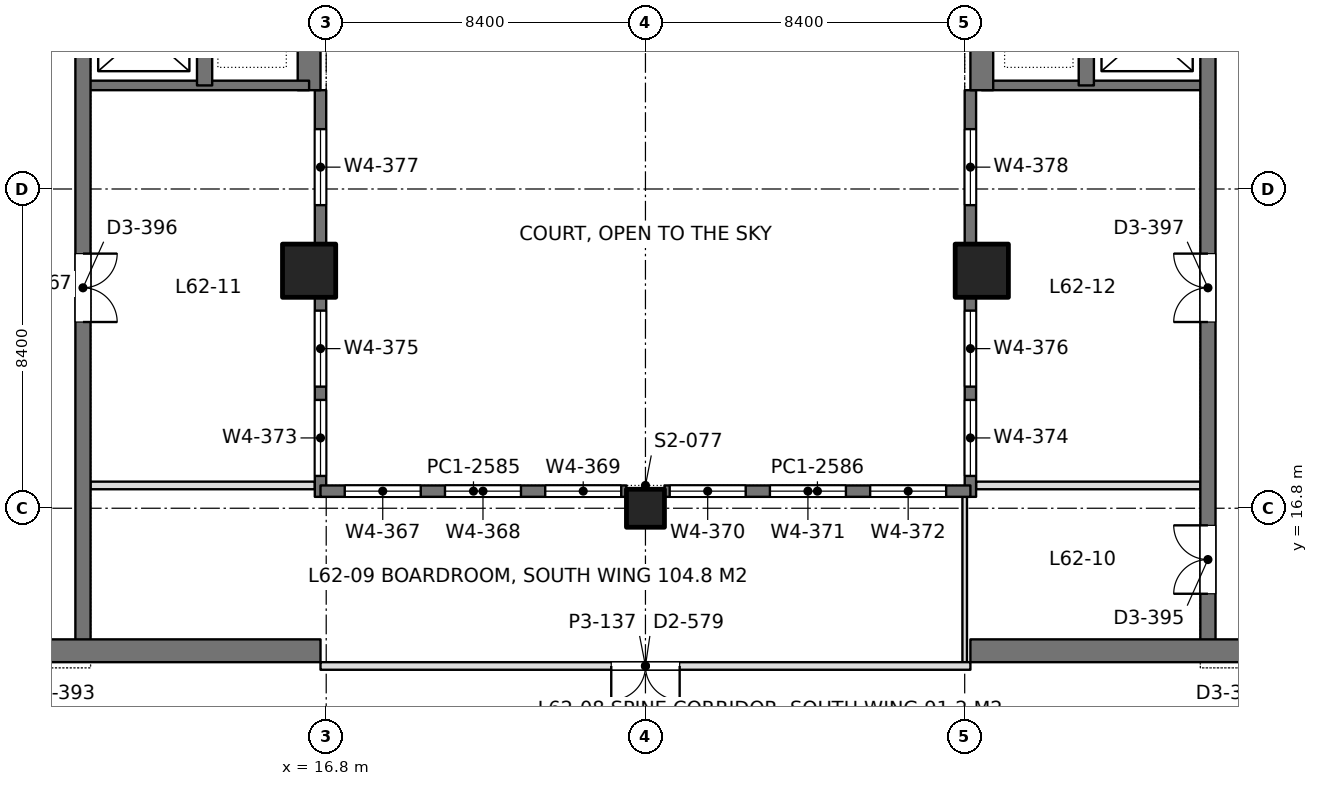
"""IFC4 building model, lengths in metres.
Left out: names, types, materials, properties, quantities, classifications, styles, units other than length and angle.
Written with IfcOpenShell. Run it as: python <this file> out.ifc"""

import sys

from ifc_helpers import new_model, si_unit, direction, frame, frame_2d, origin, origin_2d, place, context, subcontext, project, spatial, rectangle, extrude, element, fill, save


model = new_model("IFC4")
c1 = context("Model", 3, precision=1e-05, world=origin(), true_north=direction((0.0, 1.0)))
c2 = subcontext(c1, "Body", "Model", "MODEL_VIEW")
j1 = project(units=[si_unit("LENGTHUNIT", "METRE"), si_unit("PLANEANGLEUNIT", "RADIAN")], contexts=[c1])
p1 = place(None, origin())
s1 = spatial("IfcSite", under=j1, at=p1, CompositionType="ELEMENT")
p2 = place(p1, origin())
s2 = spatial("IfcBuilding", under=s1, at=p2, CompositionType="ELEMENT")
p3 = place(p2, frame((0.0, 0.0, 272.7)))
s3 = spatial("IfcBuildingStorey", under=s2, at=p3, CompositionType="ELEMENT", Elevation=272.7)
p4 = place(p3, frame((25.2, 16.8, 0.0), z_axis=(0.0, 0.0, 1.0), x_axis=(1.0, 0.0, 0.0)))
e1 = element("IfcColumn", 1, at=p4, inside=s3, PredefinedType="COLUMN", context=c2, shape_type="SweptSolid", body=[
    extrude(rectangle(XDim=1.0, YDim=1.0, at=origin_2d()), origin(), (0.0, 0.0, 1.0), 4.5),
])
for number, where, z_axis, x_axis in (
    (2, (16.35, 23.05, 0.0), (0.0, 0.0, 1.0), (1.0, 0.0, 0.0)),
    (3, (34.05, 23.05, 0.0), (0.0, 0.0, 1.0), (1.0, 0.0, 0.0)),
):
    element("IfcColumn", number, at=place(p3, frame(where, z_axis=z_axis, x_axis=x_axis)), inside=s3, PredefinedType="COLUMN", context=c2, shape_type="SweptSolid", body=[
        extrude(rectangle(XDim=1.4, YDim=1.4, at=origin_2d()), origin(), (0.0, 0.0, 1.0), 4.5),
    ])
p5 = place(p3, frame((-1.05, 13.05, 0.0), z_axis=(0.0, 0.0, 1.0), x_axis=(1.0, 0.0, 0.0)))
e4 = element("IfcWall", 4, at=p5, inside=s3, PredefinedType="SHEAR", context=c2, shape_type="SweptSolid", body=[
    extrude(rectangle(XDim=17.7, YDim=0.6, at=frame_2d((8.85, 0.0))), origin(), (0.0, 0.0, 1.0), 4.5),
])
p6 = place(p5, frame((8.8, 0.0, 0.0)))
e5 = element("IfcOpeningElement", 5, at=p6, cuts=e4, PredefinedType="OPENING", context=c2, shape_type="SweptSolid", body=[
    extrude(rectangle(XDim=1.8, YDim=2.4, at=frame_2d((0.9, 1.2))), frame((0.0, 0.31, 0.0), z_axis=(0.0, -1.0, 0.0), x_axis=(1.0, 0.0, 0.0)), (0.0, 0.0, 1.0), 0.62),
])
p7 = place(p3, frame((16.35, 27.8, 0.0), z_axis=(0.0, 0.0, 1.0), x_axis=(0.0, 1.0, 0.0)))
e6 = element("IfcWall", 6, at=p7, inside=s3, PredefinedType="SHEAR", context=c2, shape_type="SweptSolid", body=[
    extrude(rectangle(XDim=9.55, YDim=0.6, at=frame_2d((4.775, 0.0))), origin(), (0.0, 0.0, 1.0), 4.5),
])
p8 = place(p3, frame((10.4, 13.05, 0.0), z_axis=(0.0, 0.0, 1.0), x_axis=(0.0, 1.0, 0.0)))
e7 = element("IfcWall", 7, at=p8, inside=s3, PredefinedType="SHEAR", context=c2, shape_type="SweptSolid", body=[
    extrude(rectangle(XDim=24.3, YDim=0.4, at=frame_2d((12.15, 0.0))), origin(), (0.0, 0.0, 1.0), 4.5),
])
p9 = place(p8, frame((15.75, 0.0, 0.0)))
e8 = element("IfcOpeningElement", 8, at=p9, cuts=e7, PredefinedType="OPENING", context=c2, shape_type="SweptSolid", body=[
    extrude(rectangle(XDim=1.1, YDim=2.2, at=frame_2d((0.55, 1.1))), frame((0.0, 0.21, 0.0), z_axis=(0.0, -1.0, 0.0), x_axis=(1.0, 0.0, 0.0)), (0.0, 0.0, 1.0), 0.42),
])
p10 = place(p8, frame((18.6, 0.0, 0.0)))
e9 = element("IfcOpeningElement", 9, at=p10, cuts=e7, PredefinedType="OPENING", context=c2, shape_type="SweptSolid", body=[
    extrude(rectangle(XDim=1.1, YDim=2.2, at=frame_2d((0.55, 1.1))), frame((0.0, 0.21, 0.0), z_axis=(0.0, -1.0, 0.0), x_axis=(1.0, 0.0, 0.0)), (0.0, 0.0, 1.0), 0.42),
])
p11 = place(p8, frame((21.45, 0.0, 0.0)))
e10 = element("IfcOpeningElement", 10, at=p11, cuts=e7, PredefinedType="OPENING", context=c2, shape_type="SweptSolid", body=[
    extrude(rectangle(XDim=1.1, YDim=2.2, at=frame_2d((0.55, 1.1))), frame((0.0, 0.21, 0.0), z_axis=(0.0, -1.0, 0.0), x_axis=(1.0, 0.0, 0.0)), (0.0, 0.0, 1.0), 0.42),
])
p12 = place(p8, frame((8.65, 0.0, 0.0)))
e11 = element("IfcOpeningElement", 11, at=p12, cuts=e7, PredefinedType="OPENING", context=c2, shape_type="SweptSolid", body=[
    extrude(rectangle(XDim=1.8, YDim=2.4, at=frame_2d((0.9, 1.2))), frame((0.0, 0.21, 0.0), z_axis=(0.0, -1.0, 0.0), x_axis=(1.0, 0.0, 0.0)), (0.0, 0.0, 1.0), 0.42),
])
p13 = place(p3, frame((13.6, 27.925, 0.0), z_axis=(0.0, 0.0, 1.0), x_axis=(0.0, 1.0, 0.0)))
e12 = element("IfcWall", 12, at=p13, inside=s3, PredefinedType="SHEAR", context=c2, shape_type="SweptSolid", body=[
    extrude(rectangle(XDim=9.425, YDim=0.4, at=frame_2d((4.712, 0.0))), origin(), (0.0, 0.0, 1.0), 4.5),
])
p14 = place(p3, frame((10.4, 27.925, 0.0), z_axis=(0.0, 0.0, 1.0), x_axis=(1.0, 0.0, 0.0)))
e13 = element("IfcWall", 13, at=p14, inside=s3, PredefinedType="SHEAR", context=c2, shape_type="SweptSolid", body=[
    extrude(rectangle(XDim=5.95, YDim=0.25, at=frame_2d((2.975, 0.0))), origin(), (0.0, 0.0, 1.0), 4.5),
])
p15 = place(p3, frame((33.75, 13.05, 0.0), z_axis=(0.0, 0.0, 1.0), x_axis=(1.0, 0.0, 0.0)))
e14 = element("IfcWall", 14, at=p15, inside=s3, PredefinedType="SHEAR", context=c2, shape_type="SweptSolid", body=[
    extrude(rectangle(XDim=17.7, YDim=0.6, at=frame_2d((8.85, 0.0))), origin(), (0.0, 0.0, 1.0), 4.5),
])
p16 = place(p15, frame((7.1, 0.0, 0.0)))
e15 = element("IfcOpeningElement", 15, at=p16, cuts=e14, PredefinedType="OPENING", context=c2, shape_type="SweptSolid", body=[
    extrude(rectangle(XDim=1.8, YDim=2.4, at=frame_2d((0.9, 1.2))), frame((0.0, 0.31, 0.0), z_axis=(0.0, -1.0, 0.0), x_axis=(1.0, 0.0, 0.0)), (0.0, 0.0, 1.0), 0.62),
])
p17 = place(p3, frame((34.05, 27.8, 0.0), z_axis=(0.0, 0.0, 1.0), x_axis=(0.0, 1.0, 0.0)))
e16 = element("IfcWall", 16, at=p17, inside=s3, PredefinedType="SHEAR", context=c2, shape_type="SweptSolid", body=[
    extrude(rectangle(XDim=9.55, YDim=0.6, at=frame_2d((4.775, 0.0))), origin(), (0.0, 0.0, 1.0), 4.5),
])
p18 = place(p3, frame((40.0, 13.05, 0.0), z_axis=(0.0, 0.0, 1.0), x_axis=(0.0, 1.0, 0.0)))
e17 = element("IfcWall", 17, at=p18, inside=s3, PredefinedType="SHEAR", context=c2, shape_type="SweptSolid", body=[
    extrude(rectangle(XDim=24.3, YDim=0.4, at=frame_2d((12.15, 0.0))), origin(), (0.0, 0.0, 1.0), 4.5),
])
p19 = place(p18, frame((15.75, 0.0, 0.0)))
e18 = element("IfcOpeningElement", 18, at=p19, cuts=e17, PredefinedType="OPENING", context=c2, shape_type="SweptSolid", body=[
    extrude(rectangle(XDim=1.1, YDim=2.2, at=frame_2d((0.55, 1.1))), frame((0.0, 0.21, 0.0), z_axis=(0.0, -1.0, 0.0), x_axis=(1.0, 0.0, 0.0)), (0.0, 0.0, 1.0), 0.42),
])
p20 = place(p18, frame((18.6, 0.0, 0.0)))
e19 = element("IfcOpeningElement", 19, at=p20, cuts=e17, PredefinedType="OPENING", context=c2, shape_type="SweptSolid", body=[
    extrude(rectangle(XDim=1.1, YDim=2.2, at=frame_2d((0.55, 1.1))), frame((0.0, 0.21, 0.0), z_axis=(0.0, -1.0, 0.0), x_axis=(1.0, 0.0, 0.0)), (0.0, 0.0, 1.0), 0.42),
])
p21 = place(p18, frame((21.45, 0.0, 0.0)))
e20 = element("IfcOpeningElement", 20, at=p21, cuts=e17, PredefinedType="OPENING", context=c2, shape_type="SweptSolid", body=[
    extrude(rectangle(XDim=1.1, YDim=2.2, at=frame_2d((0.55, 1.1))), frame((0.0, 0.21, 0.0), z_axis=(0.0, -1.0, 0.0), x_axis=(1.0, 0.0, 0.0)), (0.0, 0.0, 1.0), 0.42),
])
p22 = place(p18, frame((8.65, 0.0, 0.0)))
e21 = element("IfcOpeningElement", 21, at=p22, cuts=e17, PredefinedType="OPENING", context=c2, shape_type="SweptSolid", body=[
    extrude(rectangle(XDim=1.8, YDim=2.4, at=frame_2d((0.9, 1.2))), frame((0.0, 0.21, 0.0), z_axis=(0.0, -1.0, 0.0), x_axis=(1.0, 0.0, 0.0)), (0.0, 0.0, 1.0), 0.42),
])
p23 = place(p18, frame((1.5, 0.0, 0.0)))
e22 = element("IfcOpeningElement", 22, at=p23, cuts=e17, PredefinedType="OPENING", context=c2, shape_type="SweptSolid", body=[
    extrude(rectangle(XDim=1.8, YDim=2.4, at=frame_2d((0.9, 1.2))), frame((0.0, 0.21, 0.0), z_axis=(0.0, -1.0, 0.0), x_axis=(1.0, 0.0, 0.0)), (0.0, 0.0, 1.0), 0.42),
])
p24 = place(p3, frame((36.8, 27.925, 0.0), z_axis=(0.0, 0.0, 1.0), x_axis=(0.0, 1.0, 0.0)))
e23 = element("IfcWall", 23, at=p24, inside=s3, PredefinedType="SHEAR", context=c2, shape_type="SweptSolid", body=[
    extrude(rectangle(XDim=9.425, YDim=0.4, at=frame_2d((4.712, 0.0))), origin(), (0.0, 0.0, 1.0), 4.5),
])
p25 = place(p3, frame((40.0, 27.925, 0.0), z_axis=(0.0, 0.0, 1.0), x_axis=(-1.0, 0.0, 0.0)))
e24 = element("IfcWall", 24, at=p25, inside=s3, PredefinedType="SHEAR", context=c2, shape_type="SweptSolid", body=[
    extrude(rectangle(XDim=5.95, YDim=0.25, at=frame_2d((2.975, 0.0))), origin(), (0.0, 0.0, 1.0), 4.5),
])
p26 = place(p3, frame((16.65, 17.1, 0.0), z_axis=(0.0, 0.0, 1.0), x_axis=(0.0, 1.0, 0.0)))
e25 = element("IfcWall", 25, at=p26, inside=s3, PredefinedType="SOLIDWALL", context=c2, shape_type="SweptSolid", body=[
    extrude(rectangle(XDim=10.7, YDim=0.3, at=frame_2d((5.35, 0.0))), origin(), (0.0, 0.0, 1.0), 4.35),
])
p27 = place(p26, frame((0.55, 0.0, 0.9)))
e26 = element("IfcOpeningElement", 26, at=p27, cuts=e25, PredefinedType="OPENING", context=c2, shape_type="SweptSolid", body=[
    extrude(rectangle(XDim=2.0, YDim=1.9, at=frame_2d((1.0, 0.95))), frame((0.0, 0.16, 0.0), z_axis=(0.0, -1.0, 0.0), x_axis=(1.0, 0.0, 0.0)), (0.0, 0.0, 1.0), 0.32),
])
p28 = place(p26, frame((2.9, 0.0, 0.9)))
e27 = element("IfcOpeningElement", 27, at=p28, cuts=e25, PredefinedType="OPENING", context=c2, shape_type="SweptSolid", body=[
    extrude(rectangle(XDim=2.0, YDim=1.9, at=frame_2d((1.0, 0.95))), frame((0.0, 0.16, 0.0), z_axis=(0.0, -1.0, 0.0), x_axis=(1.0, 0.0, 0.0)), (0.0, 0.0, 1.0), 0.32),
])
p29 = place(p26, frame((7.675, 0.0, 0.9)))
e28 = element("IfcOpeningElement", 28, at=p29, cuts=e25, PredefinedType="OPENING", context=c2, shape_type="SweptSolid", body=[
    extrude(rectangle(XDim=2.0, YDim=1.9, at=frame_2d((1.0, 0.95))), frame((0.0, 0.16, 0.0), z_axis=(0.0, -1.0, 0.0), x_axis=(1.0, 0.0, 0.0)), (0.0, 0.0, 1.0), 0.32),
])
p30 = place(p3, frame((33.75, 17.1, 0.0), z_axis=(0.0, 0.0, 1.0), x_axis=(0.0, 1.0, 0.0)))
e29 = element("IfcWall", 29, at=p30, inside=s3, PredefinedType="SOLIDWALL", context=c2, shape_type="SweptSolid", body=[
    extrude(rectangle(XDim=10.7, YDim=0.3, at=frame_2d((5.35, 0.0))), origin(), (0.0, 0.0, 1.0), 4.35),
])
p31 = place(p30, frame((0.55, 0.0, 0.9)))
e30 = element("IfcOpeningElement", 30, at=p31, cuts=e29, PredefinedType="OPENING", context=c2, shape_type="SweptSolid", body=[
    extrude(rectangle(XDim=2.0, YDim=1.9, at=frame_2d((1.0, 0.95))), frame((0.0, 0.16, 0.0), z_axis=(0.0, -1.0, 0.0), x_axis=(1.0, 0.0, 0.0)), (0.0, 0.0, 1.0), 0.32),
])
p32 = place(p30, frame((2.9, 0.0, 0.9)))
e31 = element("IfcOpeningElement", 31, at=p32, cuts=e29, PredefinedType="OPENING", context=c2, shape_type="SweptSolid", body=[
    extrude(rectangle(XDim=2.0, YDim=1.9, at=frame_2d((1.0, 0.95))), frame((0.0, 0.16, 0.0), z_axis=(0.0, -1.0, 0.0), x_axis=(1.0, 0.0, 0.0)), (0.0, 0.0, 1.0), 0.32),
])
p33 = place(p30, frame((7.675, 0.0, 0.9)))
e32 = element("IfcOpeningElement", 32, at=p33, cuts=e29, PredefinedType="OPENING", context=c2, shape_type="SweptSolid", body=[
    extrude(rectangle(XDim=2.0, YDim=1.9, at=frame_2d((1.0, 0.95))), frame((0.0, 0.16, 0.0), z_axis=(0.0, -1.0, 0.0), x_axis=(1.0, 0.0, 0.0)), (0.0, 0.0, 1.0), 0.32),
])
p34 = place(p3, frame((16.65, 17.25, 0.0), z_axis=(0.0, 0.0, 1.0), x_axis=(1.0, 0.0, 0.0)))
e33 = element("IfcWall", 33, at=p34, inside=s3, PredefinedType="SOLIDWALL", context=c2, shape_type="SweptSolid", body=[
    extrude(rectangle(XDim=8.05, YDim=0.3, at=frame_2d((4.025, 0.0))), origin(), (0.0, 0.0, 1.0), 4.35),
])
p35 = place(p34, frame((0.637, 0.0, 0.9)))
e34 = element("IfcOpeningElement", 34, at=p35, cuts=e33, PredefinedType="OPENING", context=c2, shape_type="SweptSolid", body=[
    extrude(rectangle(XDim=2.0, YDim=1.9, at=frame_2d((1.0, 0.95))), frame((0.0, 0.16, 0.0), z_axis=(0.0, -1.0, 0.0), x_axis=(1.0, 0.0, 0.0)), (0.0, 0.0, 1.0), 0.32),
])
p36 = place(p34, frame((3.275, 0.0, 0.9)))
e35 = element("IfcOpeningElement", 35, at=p36, cuts=e33, PredefinedType="OPENING", context=c2, shape_type="SweptSolid", body=[
    extrude(rectangle(XDim=2.0, YDim=1.9, at=frame_2d((1.0, 0.95))), frame((0.0, 0.16, 0.0), z_axis=(0.0, -1.0, 0.0), x_axis=(1.0, 0.0, 0.0)), (0.0, 0.0, 1.0), 0.32),
])
p37 = place(p34, frame((5.913, 0.0, 0.9)))
e36 = element("IfcOpeningElement", 36, at=p37, cuts=e33, PredefinedType="OPENING", context=c2, shape_type="SweptSolid", body=[
    extrude(rectangle(XDim=2.0, YDim=1.9, at=frame_2d((1.0, 0.95))), frame((0.0, 0.16, 0.0), z_axis=(0.0, -1.0, 0.0), x_axis=(1.0, 0.0, 0.0)), (0.0, 0.0, 1.0), 0.32),
])
p38 = place(p3, frame((25.7, 17.25, 0.0), z_axis=(0.0, 0.0, 1.0), x_axis=(1.0, 0.0, 0.0)))
e37 = element("IfcWall", 37, at=p38, inside=s3, PredefinedType="SOLIDWALL", context=c2, shape_type="SweptSolid", body=[
    extrude(rectangle(XDim=8.05, YDim=0.3, at=frame_2d((4.025, 0.0))), origin(), (0.0, 0.0, 1.0), 4.35),
])
p39 = place(p38, frame((0.137, 0.0, 0.9)))
e38 = element("IfcOpeningElement", 38, at=p39, cuts=e37, PredefinedType="OPENING", context=c2, shape_type="SweptSolid", body=[
    extrude(rectangle(XDim=2.0, YDim=1.9, at=frame_2d((1.0, 0.95))), frame((0.0, 0.16, 0.0), z_axis=(0.0, -1.0, 0.0), x_axis=(1.0, 0.0, 0.0)), (0.0, 0.0, 1.0), 0.32),
])
p40 = place(p38, frame((2.775, 0.0, 0.9)))
e39 = element("IfcOpeningElement", 39, at=p40, cuts=e37, PredefinedType="OPENING", context=c2, shape_type="SweptSolid", body=[
    extrude(rectangle(XDim=2.0, YDim=1.9, at=frame_2d((1.0, 0.95))), frame((0.0, 0.16, 0.0), z_axis=(0.0, -1.0, 0.0), x_axis=(1.0, 0.0, 0.0)), (0.0, 0.0, 1.0), 0.32),
])
p41 = place(p38, frame((5.413, 0.0, 0.9)))
e40 = element("IfcOpeningElement", 40, at=p41, cuts=e37, PredefinedType="OPENING", context=c2, shape_type="SweptSolid", body=[
    extrude(rectangle(XDim=2.0, YDim=1.9, at=frame_2d((1.0, 0.95))), frame((0.0, 0.16, 0.0), z_axis=(0.0, -1.0, 0.0), x_axis=(1.0, 0.0, 0.0)), (0.0, 0.0, 1.0), 0.32),
])
for number, where, z_axis, x_axis in (
    (41, (10.598, 17.4, 0.0), (0.0, 0.0, 1.0), (1.0, 0.0, 0.0)),
    (42, (33.898, 17.4, 0.0), (0.0, 0.0, 1.0), (1.0, 0.0, 0.0)),
):
    element("IfcWall", number, at=place(p3, frame(where, z_axis=z_axis, x_axis=x_axis)), inside=s3, PredefinedType="PARTITIONING", context=c2, shape_type="SweptSolid", body=[
        extrude(rectangle(XDim=5.904, YDim=0.2, at=frame_2d((2.952, 0.0))), origin(), (0.0, 0.0, 1.0), 3.8),
    ])
p42 = place(p3, frame((33.6, 12.6, 0.0), z_axis=(0.0, 0.0, 1.0), x_axis=(0.0, 1.0, 0.0)))
e43 = element("IfcWall", 43, at=p42, inside=s3, PredefinedType="PARTITIONING", context=c2, shape_type="SweptSolid", body=[
    extrude(rectangle(XDim=4.502, YDim=0.12, at=frame_2d((2.251, 0.0))), origin(), (0.0, 0.0, 1.0), 3.66),
])
p43 = place(p3, frame((16.65, 12.65, 0.0), z_axis=(0.0, 0.0, 1.0), x_axis=(1.0, 0.0, 0.0)))
e44 = element("IfcWall", 44, at=p43, inside=s3, PredefinedType="PARTITIONING", context=c2, shape_type="SweptSolid", body=[
    extrude(rectangle(XDim=17.1, YDim=0.2, at=frame_2d((8.55, 0.0))), origin(), (0.0, 0.0, 1.0), 3.8),
])
p44 = place(p43, frame((7.65, 0.0, 0.0)))
e45 = element("IfcOpeningElement", 45, at=p44, cuts=e44, PredefinedType="OPENING", context=c2, shape_type="SweptSolid", body=[
    extrude(rectangle(XDim=1.8, YDim=2.2, at=frame_2d((0.9, 1.1))), frame((0.0, 0.11, 0.0), z_axis=(0.0, -1.0, 0.0), x_axis=(1.0, 0.0, 0.0)), (0.0, 0.0, 1.0), 0.22),
])
p45 = place(p27, origin())
e46 = element("IfcWindow", 46, at=p45, inside=s3, PartitioningType="SINGLE_PANEL", PredefinedType="WINDOW", context=c2, shape_type="SweptSolid", body=[
    extrude(rectangle(XDim=2.0, YDim=1.9, at=frame_2d((1.0, 0.95))), frame((0.0, 0.03, 0.0), z_axis=(0.0, -1.0, 0.0), x_axis=(1.0, 0.0, 0.0)), (0.0, 0.0, 1.0), 0.06),
])
fill(e26, e46)
p46 = place(p28, origin())
e47 = element("IfcWindow", 47, at=p46, inside=s3, PartitioningType="SINGLE_PANEL", PredefinedType="WINDOW", context=c2, shape_type="SweptSolid", body=[
    extrude(rectangle(XDim=2.0, YDim=1.9, at=frame_2d((1.0, 0.95))), frame((0.0, 0.03, 0.0), z_axis=(0.0, -1.0, 0.0), x_axis=(1.0, 0.0, 0.0)), (0.0, 0.0, 1.0), 0.06),
])
fill(e27, e47)
p47 = place(p29, origin())
e48 = element("IfcWindow", 48, at=p47, inside=s3, PartitioningType="SINGLE_PANEL", PredefinedType="WINDOW", context=c2, shape_type="SweptSolid", body=[
    extrude(rectangle(XDim=2.0, YDim=1.9, at=frame_2d((1.0, 0.95))), frame((0.0, 0.03, 0.0), z_axis=(0.0, -1.0, 0.0), x_axis=(1.0, 0.0, 0.0)), (0.0, 0.0, 1.0), 0.06),
])
fill(e28, e48)
p48 = place(p31, origin())
e49 = element("IfcWindow", 49, at=p48, inside=s3, PartitioningType="SINGLE_PANEL", PredefinedType="WINDOW", context=c2, shape_type="SweptSolid", body=[
    extrude(rectangle(XDim=2.0, YDim=1.9, at=frame_2d((1.0, 0.95))), frame((0.0, 0.03, 0.0), z_axis=(0.0, -1.0, 0.0), x_axis=(1.0, 0.0, 0.0)), (0.0, 0.0, 1.0), 0.06),
])
fill(e30, e49)
p49 = place(p32, origin())
e50 = element("IfcWindow", 50, at=p49, inside=s3, PartitioningType="SINGLE_PANEL", PredefinedType="WINDOW", context=c2, shape_type="SweptSolid", body=[
    extrude(rectangle(XDim=2.0, YDim=1.9, at=frame_2d((1.0, 0.95))), frame((0.0, 0.03, 0.0), z_axis=(0.0, -1.0, 0.0), x_axis=(1.0, 0.0, 0.0)), (0.0, 0.0, 1.0), 0.06),
])
fill(e31, e50)
p50 = place(p33, origin())
e51 = element("IfcWindow", 51, at=p50, inside=s3, PartitioningType="SINGLE_PANEL", PredefinedType="WINDOW", context=c2, shape_type="SweptSolid", body=[
    extrude(rectangle(XDim=2.0, YDim=1.9, at=frame_2d((1.0, 0.95))), frame((0.0, 0.03, 0.0), z_axis=(0.0, -1.0, 0.0), x_axis=(1.0, 0.0, 0.0)), (0.0, 0.0, 1.0), 0.06),
])
fill(e32, e51)
p51 = place(p35, origin())
e52 = element("IfcWindow", 52, at=p51, inside=s3, PartitioningType="SINGLE_PANEL", PredefinedType="WINDOW", context=c2, shape_type="SweptSolid", body=[
    extrude(rectangle(XDim=2.0, YDim=1.9, at=frame_2d((1.0, 0.95))), frame((0.0, 0.03, 0.0), z_axis=(0.0, -1.0, 0.0), x_axis=(1.0, 0.0, 0.0)), (0.0, 0.0, 1.0), 0.06),
])
fill(e34, e52)
p52 = place(p36, origin())
e53 = element("IfcWindow", 53, at=p52, inside=s3, PartitioningType="SINGLE_PANEL", PredefinedType="WINDOW", context=c2, shape_type="SweptSolid", body=[
    extrude(rectangle(XDim=2.0, YDim=1.9, at=frame_2d((1.0, 0.95))), frame((0.0, 0.03, 0.0), z_axis=(0.0, -1.0, 0.0), x_axis=(1.0, 0.0, 0.0)), (0.0, 0.0, 1.0), 0.06),
])
fill(e35, e53)
p53 = place(p37, origin())
e54 = element("IfcWindow", 54, at=p53, inside=s3, PartitioningType="SINGLE_PANEL", PredefinedType="WINDOW", context=c2, shape_type="SweptSolid", body=[
    extrude(rectangle(XDim=2.0, YDim=1.9, at=frame_2d((1.0, 0.95))), frame((0.0, 0.03, 0.0), z_axis=(0.0, -1.0, 0.0), x_axis=(1.0, 0.0, 0.0)), (0.0, 0.0, 1.0), 0.06),
])
fill(e36, e54)
p54 = place(p39, origin())
e55 = element("IfcWindow", 55, at=p54, inside=s3, PartitioningType="SINGLE_PANEL", PredefinedType="WINDOW", context=c2, shape_type="SweptSolid", body=[
    extrude(rectangle(XDim=2.0, YDim=1.9, at=frame_2d((1.0, 0.95))), frame((0.0, 0.03, 0.0), z_axis=(0.0, -1.0, 0.0), x_axis=(1.0, 0.0, 0.0)), (0.0, 0.0, 1.0), 0.06),
])
fill(e38, e55)
p55 = place(p40, origin())
e56 = element("IfcWindow", 56, at=p55, inside=s3, PartitioningType="SINGLE_PANEL", PredefinedType="WINDOW", context=c2, shape_type="SweptSolid", body=[
    extrude(rectangle(XDim=2.0, YDim=1.9, at=frame_2d((1.0, 0.95))), frame((0.0, 0.03, 0.0), z_axis=(0.0, -1.0, 0.0), x_axis=(1.0, 0.0, 0.0)), (0.0, 0.0, 1.0), 0.06),
])
fill(e39, e56)
p56 = place(p41, origin())
e57 = element("IfcWindow", 57, at=p56, inside=s3, PartitioningType="SINGLE_PANEL", PredefinedType="WINDOW", context=c2, shape_type="SweptSolid", body=[
    extrude(rectangle(XDim=2.0, YDim=1.9, at=frame_2d((1.0, 0.95))), frame((0.0, 0.03, 0.0), z_axis=(0.0, -1.0, 0.0), x_axis=(1.0, 0.0, 0.0)), (0.0, 0.0, 1.0), 0.06),
])
fill(e40, e57)
p57 = place(p12, frame((1.8, 0.0, 0.0), z_axis=(0.0, 0.0, 1.0), x_axis=(-1.0, 0.0, 0.0)))
e58 = element("IfcDoor", 58, at=p57, inside=s3, OperationType="DOUBLE_DOOR_SINGLE_SWING", PredefinedType="DOOR", context=c2, shape_type="SweptSolid", body=[
    extrude(rectangle(XDim=1.8, YDim=2.4, at=frame_2d((0.9, 1.2))), frame((0.0, 0.025, 0.0), z_axis=(0.0, -1.0, 0.0), x_axis=(1.0, 0.0, 0.0)), (0.0, 0.0, 1.0), 0.05),
])
fill(e11, e58)
p58 = place(p22, origin())
e59 = element("IfcDoor", 59, at=p58, inside=s3, OperationType="DOUBLE_DOOR_SINGLE_SWING", PredefinedType="DOOR", context=c2, shape_type="SweptSolid", body=[
    extrude(rectangle(XDim=1.8, YDim=2.4, at=frame_2d((0.9, 1.2))), frame((0.0, 0.025, 0.0), z_axis=(0.0, -1.0, 0.0), x_axis=(1.0, 0.0, 0.0)), (0.0, 0.0, 1.0), 0.05),
])
fill(e21, e59)
p59 = place(p23, origin())
e60 = element("IfcDoor", 60, at=p59, inside=s3, OperationType="DOUBLE_DOOR_SINGLE_SWING", PredefinedType="DOOR", context=c2, shape_type="SweptSolid", body=[
    extrude(rectangle(XDim=1.8, YDim=2.4, at=frame_2d((0.9, 1.2))), frame((0.0, 0.025, 0.0), z_axis=(0.0, -1.0, 0.0), x_axis=(1.0, 0.0, 0.0)), (0.0, 0.0, 1.0), 0.05),
])
fill(e22, e60)
p60 = place(p44, frame((1.8, 0.0, 0.0), z_axis=(0.0, 0.0, 1.0), x_axis=(-1.0, 0.0, 0.0)))
e61 = element("IfcDoor", 61, at=p60, inside=s3, OperationType="DOUBLE_DOOR_SINGLE_SWING", PredefinedType="DOOR", context=c2, shape_type="SweptSolid", body=[
    extrude(rectangle(XDim=1.8, YDim=2.2, at=frame_2d((0.9, 1.1))), frame((0.0, 0.025, 0.0), z_axis=(0.0, -1.0, 0.0), x_axis=(1.0, 0.0, 0.0)), (0.0, 0.0, 1.0), 0.05),
])
fill(e45, e61)
save(model, sys.argv[1])
